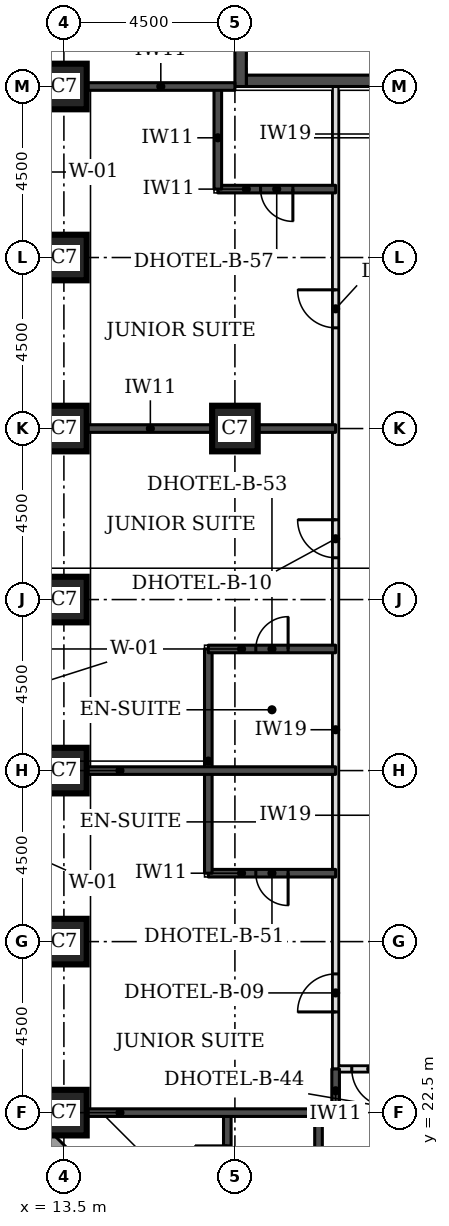
"""IFC4 building model, lengths in metres.
Left out: names, types, materials, properties, quantities, classifications, styles, units other than length and angle.
Written with IfcOpenShell. Run it as: python <this file> out.ifc"""

import sys

from ifc_helpers import new_model, si_unit, direction, frame, frame_2d, origin, origin_2d, place, context, subcontext, project, spatial, rectangle, extrude, element, fill, save


model = new_model("IFC4")
c1 = context("Model", 3, precision=1e-05, world=origin(), true_north=direction((0.0, 1.0)))
c2 = subcontext(c1, "Body", "Model", "MODEL_VIEW")
j1 = project(units=[si_unit("LENGTHUNIT", "METRE"), si_unit("PLANEANGLEUNIT", "RADIAN")], contexts=[c1])
p1 = place(None, origin())
s1 = spatial("IfcSite", under=j1, at=p1, CompositionType="ELEMENT")
p2 = place(p1, origin())
s2 = spatial("IfcBuilding", under=s1, at=p2, CompositionType="ELEMENT")
p3 = place(p2, frame((0.0, 0.0, 29.7)))
s3 = spatial("IfcBuildingStorey", under=s2, at=p3, CompositionType="ELEMENT", Elevation=29.7)
for number, where, z_axis, x_axis in (
    (1, (13.5, 22.5, 0.0), (0.0, 0.0, 1.0), (1.0, 0.0, 0.0)),
    (2, (13.5, 27.0, 0.0), (0.0, 0.0, 1.0), (1.0, 0.0, 0.0)),
    (3, (13.5, 31.5, 0.0), (0.0, 0.0, 1.0), (1.0, 0.0, 0.0)),
    (4, (13.5, 36.0, 0.0), (0.0, 0.0, 1.0), (1.0, 0.0, 0.0)),
    (5, (13.5, 40.5, 0.0), (0.0, 0.0, 1.0), (1.0, 0.0, 0.0)),
    (6, (18.0, 40.5, 0.0), (0.0, 0.0, 1.0), (1.0, 0.0, 0.0)),
    (7, (13.5, 45.0, 0.0), (0.0, 0.0, 1.0), (1.0, 0.0, 0.0)),
    (8, (13.5, 49.5, 0.0), (0.0, 0.0, 1.0), (1.0, 0.0, 0.0)),
):
    element("IfcColumn", number, at=place(p3, frame(where, z_axis=z_axis, x_axis=x_axis)), inside=s3, PredefinedType="COLUMN", context=c2, shape_type="SweptSolid", body=[
        extrude(rectangle(XDim=1.2, YDim=1.2, at=origin_2d()), origin(), (0.0, 0.0, 1.0), 3.3),
    ])
p4 = place(p3, frame((18.3, 49.65, 0.0), z_axis=(0.0, 0.0, 1.0), x_axis=(1.0, 0.0, 0.0)))
e9 = element("IfcWall", 9, at=p4, inside=s3, PredefinedType="SHEAR", context=c2, shape_type="SweptSolid", body=[
    extrude(rectangle(XDim=8.4, YDim=0.3, at=frame_2d((4.2, 0.0))), origin(), (0.0, 0.0, 1.0), 3.3),
])
p5 = place(p3, frame((18.15, 49.5, 0.0), z_axis=(0.0, 0.0, 1.0), x_axis=(0.0, 1.0, 0.0)))
e10 = element("IfcWall", 10, at=p5, inside=s3, PredefinedType="SHEAR", context=c2, shape_type="SweptSolid", body=[
    extrude(rectangle(XDim=9.0, YDim=0.3, at=frame_2d((4.5, 0.0))), origin(), (0.0, 0.0, 1.0), 3.3),
])
p6 = place(p3, frame((12.674, 22.23, 0.0), z_axis=(0.0, 0.0, 1.0), x_axis=(0.707106781187, -0.707106781187, 0.0)))
e11 = element("IfcWall", 11, at=p6, inside=s3, PredefinedType="STANDARD", context=c2, shape_type="SweptSolid", body=[
    extrude(rectangle(XDim=7.151, YDim=0.35, at=frame_2d((3.576, 0.0))), origin(), (0.0, 0.0, 1.0), 3.055),
])
p7 = place(p6, frame((1.926, 0.0, 0.8)))
e12 = element("IfcOpeningElement", 12, at=p7, cuts=e11, PredefinedType="OPENING", context=c2, shape_type="SweptSolid", body=[
    extrude(rectangle(XDim=3.3, YDim=1.5, at=frame_2d((1.65, 0.75))), frame((0.0, 0.185, 0.0), z_axis=(0.0, -1.0, 0.0), x_axis=(1.0, 0.0, 0.0)), (0.0, 0.0, 1.0), 0.37),
])
p8 = place(p3, frame((20.65, 23.65, 0.0), z_axis=(0.0, 0.0, 1.0), x_axis=(1.0, 0.0, 0.0)))
e13 = element("IfcWall", 13, at=p8, inside=s3, PredefinedType="PARTITIONING", context=c2, shape_type="SweptSolid", body=[
    extrude(rectangle(XDim=32.2, YDim=0.15, at=frame_2d((16.1, 0.0))), origin(), (0.0, 0.0, 1.0), 3.08),
])
p9 = place(p8, frame((2.55, 0.0, 0.0)))
e14 = element("IfcOpeningElement", 14, at=p9, cuts=e13, PredefinedType="OPENING", context=c2, shape_type="SweptSolid", body=[
    extrude(rectangle(XDim=1.0, YDim=2.1, at=frame_2d((0.5, 1.05))), frame((0.0, 0.085, 0.0), z_axis=(0.0, -1.0, 0.0), x_axis=(1.0, 0.0, 0.0)), (0.0, 0.0, 1.0), 0.17),
])
p10 = place(p8, frame((9.4, 0.0, 0.0)))
e15 = element("IfcOpeningElement", 15, at=p10, cuts=e13, PredefinedType="OPENING", context=c2, shape_type="SweptSolid", body=[
    extrude(rectangle(XDim=1.0, YDim=2.1, at=frame_2d((0.5, 1.05))), frame((0.0, 0.085, 0.0), z_axis=(0.0, -1.0, 0.0), x_axis=(1.0, 0.0, 0.0)), (0.0, 0.0, 1.0), 0.17),
])
p11 = place(p8, frame((11.55, 0.0, 0.0)))
e16 = element("IfcOpeningElement", 16, at=p11, cuts=e13, PredefinedType="OPENING", context=c2, shape_type="SweptSolid", body=[
    extrude(rectangle(XDim=1.0, YDim=2.1, at=frame_2d((0.5, 1.05))), frame((0.0, 0.085, 0.0), z_axis=(0.0, -1.0, 0.0), x_axis=(1.0, 0.0, 0.0)), (0.0, 0.0, 1.0), 0.17),
])
p12 = place(p8, frame((18.4, 0.0, 0.0)))
e17 = element("IfcOpeningElement", 17, at=p12, cuts=e13, PredefinedType="OPENING", context=c2, shape_type="SweptSolid", body=[
    extrude(rectangle(XDim=1.0, YDim=2.1, at=frame_2d((0.5, 1.05))), frame((0.0, 0.085, 0.0), z_axis=(0.0, -1.0, 0.0), x_axis=(1.0, 0.0, 0.0)), (0.0, 0.0, 1.0), 0.17),
])
p13 = place(p8, frame((20.55, 0.0, 0.0)))
e18 = element("IfcOpeningElement", 18, at=p13, cuts=e13, PredefinedType="OPENING", context=c2, shape_type="SweptSolid", body=[
    extrude(rectangle(XDim=1.0, YDim=2.1, at=frame_2d((0.5, 1.05))), frame((0.0, 0.085, 0.0), z_axis=(0.0, -1.0, 0.0), x_axis=(1.0, 0.0, 0.0)), (0.0, 0.0, 1.0), 0.17),
])
p14 = place(p8, frame((27.4, 0.0, 0.0)))
e19 = element("IfcOpeningElement", 19, at=p14, cuts=e13, PredefinedType="OPENING", context=c2, shape_type="SweptSolid", body=[
    extrude(rectangle(XDim=1.0, YDim=2.1, at=frame_2d((0.5, 1.05))), frame((0.0, 0.085, 0.0), z_axis=(0.0, -1.0, 0.0), x_axis=(1.0, 0.0, 0.0)), (0.0, 0.0, 1.0), 0.17),
])
p15 = place(p8, frame((0.425, 0.0, 0.0)))
e20 = element("IfcOpeningElement", 20, at=p15, cuts=e13, PredefinedType="OPENING", context=c2, shape_type="SweptSolid", body=[
    extrude(rectangle(XDim=1.0, YDim=2.1, at=frame_2d((0.5, 1.05))), frame((0.0, 0.085, 0.0), z_axis=(0.0, -1.0, 0.0), x_axis=(1.0, 0.0, 0.0)), (0.0, 0.0, 1.0), 0.17),
])
p16 = place(p8, frame((30.025, 0.0, 0.0)))
e21 = element("IfcOpeningElement", 21, at=p16, cuts=e13, PredefinedType="OPENING", context=c2, shape_type="SweptSolid", body=[
    extrude(rectangle(XDim=1.0, YDim=2.1, at=frame_2d((0.5, 1.05))), frame((0.0, 0.085, 0.0), z_axis=(0.0, -1.0, 0.0), x_axis=(1.0, 0.0, 0.0)), (0.0, 0.0, 1.0), 0.17),
])
p17 = place(p3, frame((20.65, 23.65, 0.0), z_axis=(0.0, 0.0, 1.0), x_axis=(0.0, 1.0, 0.0)))
e22 = element("IfcWall", 22, at=p17, inside=s3, PredefinedType="PARTITIONING", context=c2, shape_type="SweptSolid", body=[
    extrude(rectangle(XDim=25.85, YDim=0.15, at=frame_2d((12.925, 0.0))), origin(), (0.0, 0.0, 1.0), 3.08),
])
p18 = place(p17, frame((1.5, 0.0, 0.0)))
e23 = element("IfcOpeningElement", 23, at=p18, cuts=e22, PredefinedType="OPENING", context=c2, shape_type="SweptSolid", body=[
    extrude(rectangle(XDim=1.0, YDim=2.1, at=frame_2d((0.5, 1.05))), frame((0.0, 0.085, 0.0), z_axis=(0.0, -1.0, 0.0), x_axis=(1.0, 0.0, 0.0)), (0.0, 0.0, 1.0), 0.17),
])
p19 = place(p17, frame((13.45, 0.0, 0.0)))
e24 = element("IfcOpeningElement", 24, at=p19, cuts=e22, PredefinedType="OPENING", context=c2, shape_type="SweptSolid", body=[
    extrude(rectangle(XDim=1.0, YDim=2.1, at=frame_2d((0.5, 1.05))), frame((0.0, 0.085, 0.0), z_axis=(0.0, -1.0, 0.0), x_axis=(1.0, 0.0, 0.0)), (0.0, 0.0, 1.0), 0.17),
])
p20 = place(p17, frame((19.5, 0.0, 0.0)))
e25 = element("IfcOpeningElement", 25, at=p20, cuts=e22, PredefinedType="OPENING", context=c2, shape_type="SweptSolid", body=[
    extrude(rectangle(XDim=1.0, YDim=2.1, at=frame_2d((0.5, 1.05))), frame((0.0, 0.085, 0.0), z_axis=(0.0, -1.0, 0.0), x_axis=(1.0, 0.0, 0.0)), (0.0, 0.0, 1.0), 0.17),
])
p21 = place(p3, frame((17.8, 20.0, 0.0), z_axis=(0.0, 0.0, 1.0), x_axis=(0.0, 1.0, 0.0)))
e26 = element("IfcWall", 26, at=p21, inside=s3, PredefinedType="SOLIDWALL", context=c2, shape_type="SweptSolid", body=[
    extrude(rectangle(XDim=2.5, YDim=0.2, at=frame_2d((1.25, 0.0))), origin(), (0.0, 0.0, 1.0), 3.08),
])
p22 = place(p21, frame((0.775, 0.0, 0.0)))
e27 = element("IfcOpeningElement", 27, at=p22, cuts=e26, PredefinedType="OPENING", context=c2, shape_type="SweptSolid", body=[
    extrude(rectangle(XDim=0.85, YDim=2.1, at=frame_2d((0.425, 1.05))), frame((0.0, 0.11, 0.0), z_axis=(0.0, -1.0, 0.0), x_axis=(1.0, 0.0, 0.0)), (0.0, 0.0, 1.0), 0.22),
])
p23 = place(p3, frame((20.2, 20.0, 0.0), z_axis=(0.0, 0.0, 1.0), x_axis=(0.0, 1.0, 0.0)))
e28 = element("IfcWall", 28, at=p23, inside=s3, PredefinedType="SOLIDWALL", context=c2, shape_type="SweptSolid", body=[
    extrude(rectangle(XDim=2.5, YDim=0.2, at=frame_2d((1.25, 0.0))), origin(), (0.0, 0.0, 1.0), 3.08),
])
p24 = place(p3, frame((14.1, 22.5, 0.0), z_axis=(0.0, 0.0, 1.0), x_axis=(1.0, 0.0, 0.0)))
e29 = element("IfcWall", 29, at=p24, inside=s3, PredefinedType="SOLIDWALL", context=c2, shape_type="SweptSolid", body=[
    extrude(rectangle(XDim=6.55, YDim=0.2, at=frame_2d((3.275, 0.0))), origin(), (0.0, 0.0, 1.0), 3.08),
])
p25 = place(p3, frame((20.65, 22.5, 0.0), z_axis=(0.0, 0.0, 1.0), x_axis=(0.0, 1.0, 0.0)))
e30 = element("IfcWall", 30, at=p25, inside=s3, PredefinedType="SOLIDWALL", context=c2, shape_type="SweptSolid", body=[
    extrude(rectangle(XDim=1.15, YDim=0.2, at=frame_2d((0.575, 0.0))), origin(), (0.0, 0.0, 1.0), 3.08),
])
p26 = place(p3, frame((17.3, 28.8, 0.0), z_axis=(0.0, 0.0, 1.0), x_axis=(1.0, 0.0, 0.0)))
e31 = element("IfcWall", 31, at=p26, inside=s3, PredefinedType="SOLIDWALL", context=c2, shape_type="SweptSolid", body=[
    extrude(rectangle(XDim=3.35, YDim=0.2, at=frame_2d((1.675, 0.0))), origin(), (0.0, 0.0, 1.0), 3.08),
])
p27 = place(p26, frame((1.25, 0.0, 0.0)))
e32 = element("IfcOpeningElement", 32, at=p27, cuts=e31, PredefinedType="OPENING", context=c2, shape_type="SweptSolid", body=[
    extrude(rectangle(XDim=0.85, YDim=2.1, at=frame_2d((0.425, 1.05))), frame((0.0, 0.11, 0.0), z_axis=(0.0, -1.0, 0.0), x_axis=(1.0, 0.0, 0.0)), (0.0, 0.0, 1.0), 0.22),
])
p28 = place(p3, frame((17.3, 28.8, 0.0), z_axis=(0.0, 0.0, 1.0), x_axis=(0.0, 1.0, 0.0)))
e33 = element("IfcWall", 33, at=p28, inside=s3, PredefinedType="SOLIDWALL", context=c2, shape_type="SweptSolid", body=[
    extrude(rectangle(XDim=5.9, YDim=0.2, at=frame_2d((2.95, 0.0))), origin(), (0.0, 0.0, 1.0), 3.08),
])
p29 = place(p3, frame((14.1, 31.5, 0.0), z_axis=(0.0, 0.0, 1.0), x_axis=(1.0, 0.0, 0.0)))
e34 = element("IfcWall", 34, at=p29, inside=s3, PredefinedType="SOLIDWALL", context=c2, shape_type="SweptSolid", body=[
    extrude(rectangle(XDim=6.55, YDim=0.2, at=frame_2d((3.275, 0.0))), origin(), (0.0, 0.0, 1.0), 3.08),
])
p30 = place(p3, frame((17.3, 34.7, 0.0), z_axis=(0.0, 0.0, 1.0), x_axis=(1.0, 0.0, 0.0)))
e35 = element("IfcWall", 35, at=p30, inside=s3, PredefinedType="SOLIDWALL", context=c2, shape_type="SweptSolid", body=[
    extrude(rectangle(XDim=3.35, YDim=0.2, at=frame_2d((1.675, 0.0))), origin(), (0.0, 0.0, 1.0), 3.08),
])
p31 = place(p30, frame((1.25, 0.0, 0.0)))
e36 = element("IfcOpeningElement", 36, at=p31, cuts=e35, PredefinedType="OPENING", context=c2, shape_type="SweptSolid", body=[
    extrude(rectangle(XDim=0.85, YDim=2.1, at=frame_2d((0.425, 1.05))), frame((0.0, 0.11, 0.0), z_axis=(0.0, -1.0, 0.0), x_axis=(1.0, 0.0, 0.0)), (0.0, 0.0, 1.0), 0.22),
])
p32 = place(p3, frame((14.1, 40.5, 0.0), z_axis=(0.0, 0.0, 1.0), x_axis=(1.0, 0.0, 0.0)))
e37 = element("IfcWall", 37, at=p32, inside=s3, PredefinedType="SOLIDWALL", context=c2, shape_type="SweptSolid", body=[
    extrude(rectangle(XDim=6.55, YDim=0.2, at=frame_2d((3.275, 0.0))), origin(), (0.0, 0.0, 1.0), 3.08),
])
p33 = place(p3, frame((17.55, 46.8, 0.0), z_axis=(0.0, 0.0, 1.0), x_axis=(1.0, 0.0, 0.0)))
e38 = element("IfcWall", 38, at=p33, inside=s3, PredefinedType="SOLIDWALL", context=c2, shape_type="SweptSolid", body=[
    extrude(rectangle(XDim=3.1, YDim=0.2, at=frame_2d((1.55, 0.0))), origin(), (0.0, 0.0, 1.0), 3.08),
])
p34 = place(p33, frame((1.125, 0.0, 0.0)))
e39 = element("IfcOpeningElement", 39, at=p34, cuts=e38, PredefinedType="OPENING", context=c2, shape_type="SweptSolid", body=[
    extrude(rectangle(XDim=0.85, YDim=2.1, at=frame_2d((0.425, 1.05))), frame((0.0, 0.11, 0.0), z_axis=(0.0, -1.0, 0.0), x_axis=(1.0, 0.0, 0.0)), (0.0, 0.0, 1.0), 0.22),
])
p35 = place(p3, frame((17.55, 46.8, 0.0), z_axis=(0.0, 0.0, 1.0), x_axis=(0.0, 1.0, 0.0)))
e40 = element("IfcWall", 40, at=p35, inside=s3, PredefinedType="SOLIDWALL", context=c2, shape_type="SweptSolid", body=[
    extrude(rectangle(XDim=2.7, YDim=0.2, at=frame_2d((1.35, 0.0))), origin(), (0.0, 0.0, 1.0), 3.08),
])
p36 = place(p3, frame((14.1, 49.5, 0.0), z_axis=(0.0, 0.0, 1.0), x_axis=(1.0, 0.0, 0.0)))
e41 = element("IfcWall", 41, at=p36, inside=s3, PredefinedType="SOLIDWALL", context=c2, shape_type="SweptSolid", body=[
    extrude(rectangle(XDim=3.9, YDim=0.2, at=frame_2d((1.95, 0.0))), origin(), (0.0, 0.0, 1.0), 3.08),
])
p37 = place(p18, origin())
e42 = element("IfcDoor", 42, at=p37, inside=s3, OperationType="SINGLE_SWING_LEFT", PredefinedType="DOOR", context=c2, shape_type="SweptSolid", body=[
    extrude(rectangle(XDim=1.0, YDim=2.1, at=frame_2d((0.5, 1.05))), frame((0.0, 0.025, 0.0), z_axis=(0.0, -1.0, 0.0), x_axis=(1.0, 0.0, 0.0)), (0.0, 0.0, 1.0), 0.05),
])
fill(e23, e42)
p38 = place(p27, frame((0.85, 0.0, 0.0), z_axis=(0.0, 0.0, 1.0), x_axis=(-1.0, 0.0, 0.0)))
e43 = element("IfcDoor", 43, at=p38, inside=s3, OperationType="SINGLE_SWING_LEFT", PredefinedType="DOOR", context=c2, shape_type="SweptSolid", body=[
    extrude(rectangle(XDim=0.85, YDim=2.1, at=frame_2d((0.425, 1.05))), frame((0.0, 0.025, 0.0), z_axis=(0.0, -1.0, 0.0), x_axis=(1.0, 0.0, 0.0)), (0.0, 0.0, 1.0), 0.05),
])
fill(e32, e43)
p39 = place(p19, origin())
e44 = element("IfcDoor", 44, at=p39, inside=s3, OperationType="SINGLE_SWING_RIGHT", PredefinedType="DOOR", context=c2, shape_type="SweptSolid", body=[
    extrude(rectangle(XDim=1.0, YDim=2.1, at=frame_2d((0.5, 1.05))), frame((0.0, 0.025, 0.0), z_axis=(0.0, -1.0, 0.0), x_axis=(1.0, 0.0, 0.0)), (0.0, 0.0, 1.0), 0.05),
])
fill(e24, e44)
p40 = place(p31, origin())
e45 = element("IfcDoor", 45, at=p40, inside=s3, OperationType="SINGLE_SWING_RIGHT", PredefinedType="DOOR", context=c2, shape_type="SweptSolid", body=[
    extrude(rectangle(XDim=0.85, YDim=2.1, at=frame_2d((0.425, 1.05))), frame((0.0, 0.025, 0.0), z_axis=(0.0, -1.0, 0.0), x_axis=(1.0, 0.0, 0.0)), (0.0, 0.0, 1.0), 0.05),
])
fill(e36, e45)
p41 = place(p20, origin())
e46 = element("IfcDoor", 46, at=p41, inside=s3, OperationType="SINGLE_SWING_RIGHT", PredefinedType="DOOR", context=c2, shape_type="SweptSolid", body=[
    extrude(rectangle(XDim=1.0, YDim=2.1, at=frame_2d((0.5, 1.05))), frame((0.0, 0.025, 0.0), z_axis=(0.0, -1.0, 0.0), x_axis=(1.0, 0.0, 0.0)), (0.0, 0.0, 1.0), 0.05),
])
fill(e25, e46)
p42 = place(p34, frame((0.85, 0.0, 0.0), z_axis=(0.0, 0.0, 1.0), x_axis=(-1.0, 0.0, 0.0)))
e47 = element("IfcDoor", 47, at=p42, inside=s3, OperationType="SINGLE_SWING_LEFT", PredefinedType="DOOR", context=c2, shape_type="SweptSolid", body=[
    extrude(rectangle(XDim=0.85, YDim=2.1, at=frame_2d((0.425, 1.05))), frame((0.0, 0.025, 0.0), z_axis=(0.0, -1.0, 0.0), x_axis=(1.0, 0.0, 0.0)), (0.0, 0.0, 1.0), 0.05),
])
fill(e39, e47)
p43 = place(p15, frame((1.0, 0.0, 0.0), z_axis=(0.0, 0.0, 1.0), x_axis=(-1.0, 0.0, 0.0)))
e48 = element("IfcDoor", 48, at=p43, inside=s3, OperationType="SINGLE_SWING_LEFT", PredefinedType="DOOR", context=c2, shape_type="SweptSolid", body=[
    extrude(rectangle(XDim=1.0, YDim=2.1, at=frame_2d((0.5, 1.05))), frame((0.0, 0.025, 0.0), z_axis=(0.0, -1.0, 0.0), x_axis=(1.0, 0.0, 0.0)), (0.0, 0.0, 1.0), 0.05),
])
fill(e20, e48)
p44 = place(p22, origin())
e49 = element("IfcDoor", 49, at=p44, inside=s3, OperationType="SINGLE_SWING_RIGHT", PredefinedType="DOOR", context=c2, shape_type="SweptSolid", body=[
    extrude(rectangle(XDim=0.85, YDim=2.1, at=frame_2d((0.425, 1.05))), frame((0.0, 0.025, 0.0), z_axis=(0.0, -1.0, 0.0), x_axis=(1.0, 0.0, 0.0)), (0.0, 0.0, 1.0), 0.05),
])
fill(e27, e49)
save(model, sys.argv[1])
